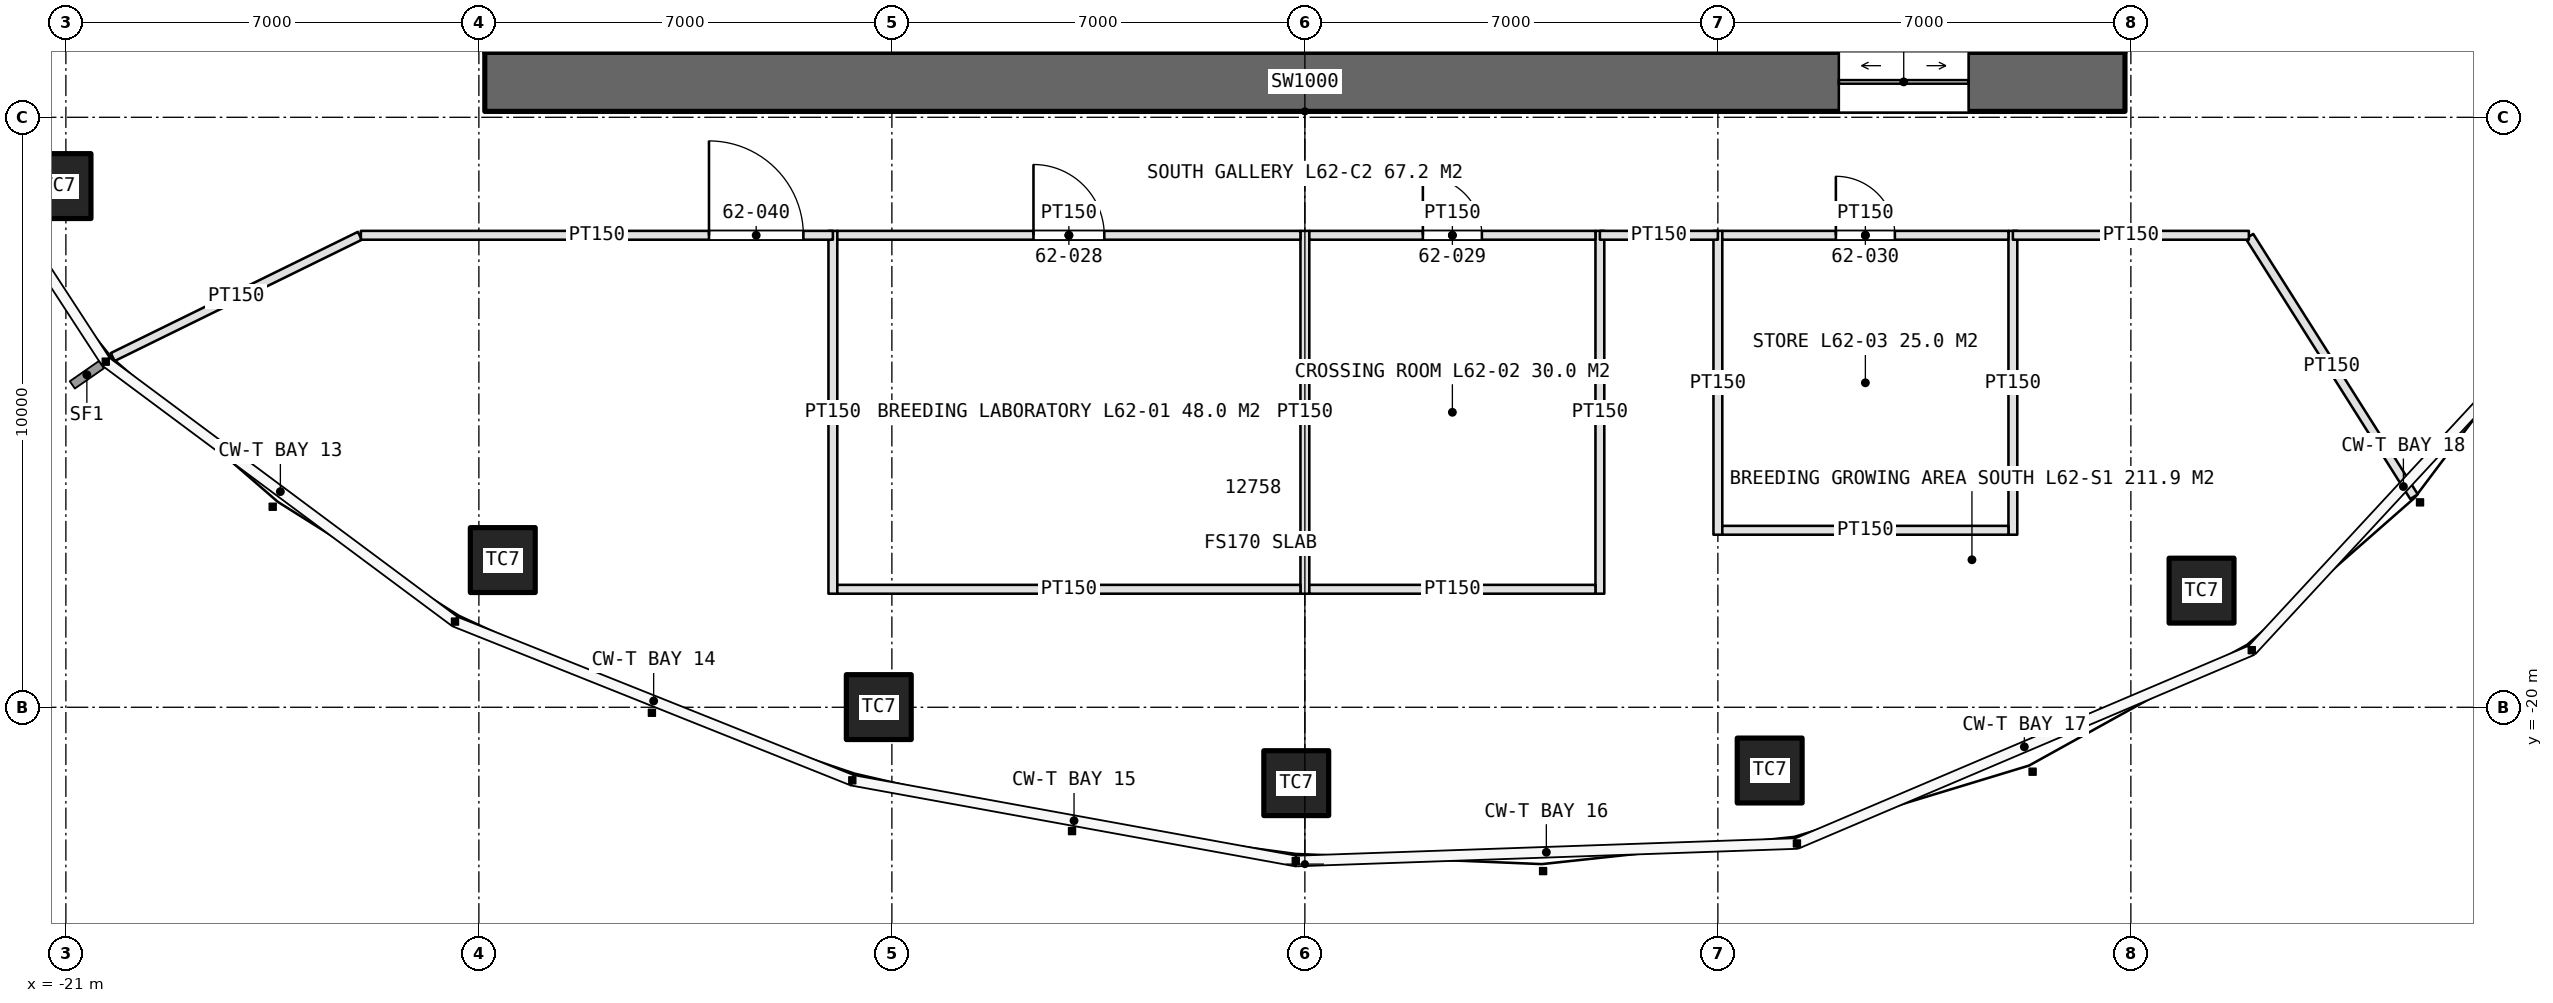
"""IFC4 building model, lengths in metres.
Left out: names, types, materials, properties, quantities, classifications, styles, units other than length and angle.
Written with IfcOpenShell. Run it as: python <this file> out.ifc"""

import sys

from ifc_helpers import new_model, si_unit, direction, frame, frame_2d, origin, origin_2d, place, context, subcontext, project, spatial, rectangle, extrude, element, fill, save


model = new_model("IFC4")
c1 = context("Model", 3, precision=1e-05, world=origin(), true_north=direction((0.0, 1.0)))
c2 = subcontext(c1, "Body", "Model", "MODEL_VIEW")
j1 = project(units=[si_unit("LENGTHUNIT", "METRE"), si_unit("PLANEANGLEUNIT", "RADIAN")], contexts=[c1])
p1 = place(None, origin())
s1 = spatial("IfcSite", under=j1, at=p1, CompositionType="ELEMENT")
p2 = place(p1, origin())
s2 = spatial("IfcBuilding", under=s1, at=p2, CompositionType="ELEMENT")
p3 = place(p2, frame((0.0, 0.0, 279.6)))
s3 = spatial("IfcBuildingStorey", under=s2, at=p3, CompositionType="ELEMENT", Elevation=279.6)
p4 = place(p3, frame((-13.9, -9.4, 0.0), z_axis=(0.0, 0.0, 1.0), x_axis=(1.0, 0.0, 0.0)))
e1 = element("IfcWall", 1, at=p4, inside=s3, PredefinedType="SHEAR", context=c2, shape_type="SweptSolid", body=[
    extrude(rectangle(XDim=27.8, YDim=1.0, at=frame_2d((13.9, 0.0))), origin(), (0.0, 0.0, 1.0), 4.2),
])
p5 = place(p4, frame((22.95, 0.0, 0.0)))
e2 = element("IfcOpeningElement", 2, at=p5, cuts=e1, PredefinedType="OPENING", context=c2, shape_type="SweptSolid", body=[
    extrude(rectangle(XDim=2.2, YDim=2.7, at=frame_2d((1.1, 1.35))), frame((0.0, 0.51, 0.0), z_axis=(0.0, -1.0, 0.0), x_axis=(1.0, 0.0, 0.0)), (0.0, 0.0, 1.0), 1.02),
])
for number, where, z_axis, x_axis in (
    (3, (-21.125, -11.166, 0.0), (0.0, 0.0, 1.0), (1.0, 0.0, 0.0)),
    (4, (-13.595, -17.505, 0.0), (0.0, 0.0, 1.0), (1.0, 0.0, 0.0)),
    (5, (-7.222, -19.997, 0.0), (0.0, 0.0, 1.0), (1.0, 0.0, 0.0)),
    (6, (-0.146, -21.286, 0.0), (0.0, 0.0, 1.0), (1.0, 0.0, 0.0)),
    (7, (7.878, -21.072, 0.0), (0.0, 0.0, 1.0), (1.0, 0.0, 0.0)),
    (8, (15.198, -18.023, 0.0), (0.0, 0.0, 1.0), (1.0, 0.0, 0.0)),
):
    element("IfcColumn", number, at=place(p3, frame(where, z_axis=z_axis, x_axis=x_axis)), inside=s3, PredefinedType="COLUMN", context=c2, shape_type="SweptSolid", body=[
        extrude(rectangle(XDim=1.1, YDim=1.1, at=origin_2d()), origin(), (0.0, 0.0, 1.0), 4.2),
    ])
for number, where, z_axis, x_axis in (
    (9, (-4.2, -4.7, 0.0), (0.0, 0.0, 1.0), (0.0, -1.0, 0.0)),
    (10, (-1.4, -4.7, 0.0), (0.0, 0.0, 1.0), (0.0, -1.0, 0.0)),
    (11, (1.4, -4.7, 0.0), (0.0, 0.0, 1.0), (0.0, -1.0, 0.0)),
    (12, (4.2, -4.7, 0.0), (0.0, 0.0, 1.0), (0.0, -1.0, 0.0)),
):
    element("IfcWall", number, at=place(p3, frame(where, z_axis=z_axis, x_axis=x_axis)), inside=s3, PredefinedType="PARTITIONING", context=c2, shape_type="SweptSolid", body=[
        extrude(rectangle(XDim=4.2, YDim=0.2, at=frame_2d((2.1, 0.0))), origin(), (0.0, 0.0, 1.0), 4.2),
    ])
for number, where, z_axis, x_axis in (
    (13, (-8.0, -11.925, 0.0), (0.0, 0.0, 1.0), (0.0, -1.0, 0.0)),
    (14, (0.0, -11.925, 0.0), (0.0, 0.0, 1.0), (0.0, -1.0, 0.0)),
    (15, (5.0, -11.925, 0.0), (0.0, 0.0, 1.0), (0.0, -1.0, 0.0)),
):
    element("IfcWall", number, at=place(p3, frame(where, z_axis=z_axis, x_axis=x_axis)), inside=s3, PredefinedType="PARTITIONING", context=c2, shape_type="SweptSolid", body=[
        extrude(rectangle(XDim=6.15, YDim=0.15, at=frame_2d((3.075, 0.0))), origin(), (0.0, 0.0, 1.0), 3.0),
    ])
p6 = place(p3, frame((-7.925, -12.0, 0.0), z_axis=(0.0, 0.0, 1.0), x_axis=(1.0, 0.0, 0.0)))
e16 = element("IfcWall", 16, at=p6, inside=s3, PredefinedType="PARTITIONING", context=c2, shape_type="SweptSolid", body=[
    extrude(rectangle(XDim=7.85, YDim=0.15, at=frame_2d((3.925, 0.0))), origin(), (0.0, 0.0, 1.0), 3.0),
])
p7 = place(p6, frame((3.325, 0.0, 0.0)))
e17 = element("IfcOpeningElement", 17, at=p7, cuts=e16, PredefinedType="OPENING", context=c2, shape_type="SweptSolid", body=[
    extrude(rectangle(XDim=1.2, YDim=2.3, at=frame_2d((0.6, 1.15))), frame((0.0, 0.085, 0.0), z_axis=(0.0, -1.0, 0.0), x_axis=(1.0, 0.0, 0.0)), (0.0, 0.0, 1.0), 0.17),
])
p8 = place(p3, frame((-7.925, -18.0, 0.0), z_axis=(0.0, 0.0, 1.0), x_axis=(1.0, 0.0, 0.0)))
e18 = element("IfcWall", 18, at=p8, inside=s3, PredefinedType="PARTITIONING", context=c2, shape_type="SweptSolid", body=[
    extrude(rectangle(XDim=7.85, YDim=0.15, at=frame_2d((3.925, 0.0))), origin(), (0.0, 0.0, 1.0), 3.0),
])
p9 = place(p3, frame((0.075, -12.0, 0.0), z_axis=(0.0, 0.0, 1.0), x_axis=(1.0, 0.0, 0.0)))
e19 = element("IfcWall", 19, at=p9, inside=s3, PredefinedType="PARTITIONING", context=c2, shape_type="SweptSolid", body=[
    extrude(rectangle(XDim=4.85, YDim=0.15, at=frame_2d((2.425, 0.0))), origin(), (0.0, 0.0, 1.0), 3.0),
])
p10 = place(p9, frame((1.925, 0.0, 0.0)))
e20 = element("IfcOpeningElement", 20, at=p10, cuts=e19, PredefinedType="OPENING", context=c2, shape_type="SweptSolid", body=[
    extrude(rectangle(XDim=1.0, YDim=2.2, at=frame_2d((0.5, 1.1))), frame((0.0, 0.085, 0.0), z_axis=(0.0, -1.0, 0.0), x_axis=(1.0, 0.0, 0.0)), (0.0, 0.0, 1.0), 0.17),
])
p11 = place(p3, frame((0.075, -18.0, 0.0), z_axis=(0.0, 0.0, 1.0), x_axis=(1.0, 0.0, 0.0)))
e21 = element("IfcWall", 21, at=p11, inside=s3, PredefinedType="PARTITIONING", context=c2, shape_type="SweptSolid", body=[
    extrude(rectangle(XDim=4.85, YDim=0.15, at=frame_2d((2.425, 0.0))), origin(), (0.0, 0.0, 1.0), 3.0),
])
for number, where, z_axis, x_axis in (
    (22, (7.0, -11.925, 0.0), (0.0, 0.0, 1.0), (0.0, -1.0, 0.0)),
    (23, (12.0, -11.925, 0.0), (0.0, 0.0, 1.0), (0.0, -1.0, 0.0)),
):
    element("IfcWall", number, at=place(p3, frame(where, z_axis=z_axis, x_axis=x_axis)), inside=s3, PredefinedType="PARTITIONING", context=c2, shape_type="SweptSolid", body=[
        extrude(rectangle(XDim=5.15, YDim=0.15, at=frame_2d((2.575, 0.0))), origin(), (0.0, 0.0, 1.0), 3.0),
    ])
p12 = place(p3, frame((7.075, -12.0, 0.0), z_axis=(0.0, 0.0, 1.0), x_axis=(1.0, 0.0, 0.0)))
e24 = element("IfcWall", 24, at=p12, inside=s3, PredefinedType="PARTITIONING", context=c2, shape_type="SweptSolid", body=[
    extrude(rectangle(XDim=4.85, YDim=0.15, at=frame_2d((2.425, 0.0))), origin(), (0.0, 0.0, 1.0), 3.0),
])
p13 = place(p12, frame((1.925, 0.0, 0.0)))
e25 = element("IfcOpeningElement", 25, at=p13, cuts=e24, PredefinedType="OPENING", context=c2, shape_type="SweptSolid", body=[
    extrude(rectangle(XDim=1.0, YDim=2.2, at=frame_2d((0.5, 1.1))), frame((0.0, 0.085, 0.0), z_axis=(0.0, -1.0, 0.0), x_axis=(1.0, 0.0, 0.0)), (0.0, 0.0, 1.0), 0.17),
])
p14 = place(p3, frame((7.075, -17.0, 0.0), z_axis=(0.0, 0.0, 1.0), x_axis=(1.0, 0.0, 0.0)))
e26 = element("IfcWall", 26, at=p14, inside=s3, PredefinedType="PARTITIONING", context=c2, shape_type="SweptSolid", body=[
    extrude(rectangle(XDim=4.85, YDim=0.15, at=frame_2d((2.425, 0.0))), origin(), (0.0, 0.0, 1.0), 3.0),
])
p15 = place(p3, frame((-16.018, -12.009, 0.0), z_axis=(0.0, 0.0, 1.0), x_axis=(-0.897771840996, -0.440460805879, 0.0)))
e27 = element("IfcWall", 27, at=p15, inside=s3, PredefinedType="PARTITIONING", context=c2, shape_type="SweptSolid", body=[
    extrude(rectangle(XDim=4.666, YDim=0.15, at=frame_2d((2.333, 0.0))), origin(), (0.0, 0.0, 1.0), 3.0),
])
p16 = place(p3, frame((16.011, -12.017, 0.0), z_axis=(0.0, 0.0, 1.0), x_axis=(0.53415837449, -0.845384427916, 0.0)))
e28 = element("IfcWall", 28, at=p16, inside=s3, PredefinedType="PARTITIONING", context=c2, shape_type="SweptSolid", body=[
    extrude(rectangle(XDim=5.22, YDim=0.15, at=frame_2d((2.61, 0.0))), origin(), (0.0, 0.0, 1.0), 3.0),
])
p17 = place(p3, frame((-16.0, -12.0, 0.0), z_axis=(0.0, 0.0, 1.0), x_axis=(1.0, 0.0, 0.0)))
e29 = element("IfcWall", 29, at=p17, inside=s3, PredefinedType="PARTITIONING", context=c2, shape_type="SweptSolid", body=[
    extrude(rectangle(XDim=8.0, YDim=0.15, at=frame_2d((4.0, 0.0))), origin(), (0.0, 0.0, 1.0), 3.0),
])
p18 = place(p17, frame((5.9, 0.0, 0.0)))
e30 = element("IfcOpeningElement", 30, at=p18, cuts=e29, PredefinedType="OPENING", context=c2, shape_type="SweptSolid", body=[
    extrude(rectangle(XDim=1.6, YDim=2.4, at=frame_2d((0.8, 1.2))), frame((0.0, 0.085, 0.0), z_axis=(0.0, -1.0, 0.0), x_axis=(1.0, 0.0, 0.0)), (0.0, 0.0, 1.0), 0.17),
])
p19 = place(p3, frame((5.0, -12.0, 0.0), z_axis=(0.0, 0.0, 1.0), x_axis=(1.0, 0.0, 0.0)))
e31 = element("IfcWall", 31, at=p19, inside=s3, PredefinedType="PARTITIONING", context=c2, shape_type="SweptSolid", body=[
    extrude(rectangle(XDim=2.0, YDim=0.15, at=frame_2d((1.0, 0.0))), origin(), (0.0, 0.0, 1.0), 3.0),
])
p20 = place(p3, frame((12.0, -12.0, 0.0), z_axis=(0.0, 0.0, 1.0), x_axis=(1.0, 0.0, 0.0)))
e32 = element("IfcWall", 32, at=p20, inside=s3, PredefinedType="PARTITIONING", context=c2, shape_type="SweptSolid", body=[
    extrude(rectangle(XDim=4.0, YDim=0.15, at=frame_2d((2.0, 0.0))), origin(), (0.0, 0.0, 1.0), 3.0),
])
p21 = place(p5, origin())
e33 = element("IfcDoor", 33, at=p21, inside=s3, OperationType="DOUBLE_DOOR_SLIDING", PredefinedType="DOOR", context=c2, shape_type="SweptSolid", body=[
    extrude(rectangle(XDim=2.2, YDim=2.7, at=frame_2d((1.1, 1.35))), frame((0.0, 0.025, 0.0), z_axis=(0.0, -1.0, 0.0), x_axis=(1.0, 0.0, 0.0)), (0.0, 0.0, 1.0), 0.05),
])
fill(e2, e33)
p22 = place(p7, origin())
e34 = element("IfcDoor", 34, at=p22, inside=s3, OperationType="SINGLE_SWING_LEFT", PredefinedType="DOOR", context=c2, shape_type="SweptSolid", body=[
    extrude(rectangle(XDim=1.2, YDim=2.3, at=frame_2d((0.6, 1.15))), frame((0.0, 0.025, 0.0), z_axis=(0.0, -1.0, 0.0), x_axis=(1.0, 0.0, 0.0)), (0.0, 0.0, 1.0), 0.05),
])
fill(e17, e34)
p23 = place(p10, origin())
e35 = element("IfcDoor", 35, at=p23, inside=s3, OperationType="SINGLE_SWING_LEFT", PredefinedType="DOOR", context=c2, shape_type="SweptSolid", body=[
    extrude(rectangle(XDim=1.0, YDim=2.2, at=frame_2d((0.5, 1.1))), frame((0.0, 0.025, 0.0), z_axis=(0.0, -1.0, 0.0), x_axis=(1.0, 0.0, 0.0)), (0.0, 0.0, 1.0), 0.05),
])
fill(e20, e35)
p24 = place(p13, origin())
e36 = element("IfcDoor", 36, at=p24, inside=s3, OperationType="SINGLE_SWING_LEFT", PredefinedType="DOOR", context=c2, shape_type="SweptSolid", body=[
    extrude(rectangle(XDim=1.0, YDim=2.2, at=frame_2d((0.5, 1.1))), frame((0.0, 0.025, 0.0), z_axis=(0.0, -1.0, 0.0), x_axis=(1.0, 0.0, 0.0)), (0.0, 0.0, 1.0), 0.05),
])
fill(e25, e36)
p25 = place(p18, origin())
e37 = element("IfcDoor", 37, at=p25, inside=s3, OperationType="DOUBLE_DOOR_SINGLE_SWING", PredefinedType="DOOR", context=c2, shape_type="SweptSolid", body=[
    extrude(rectangle(XDim=1.6, YDim=2.4, at=frame_2d((0.8, 1.2))), frame((0.0, 0.025, 0.0), z_axis=(0.0, -1.0, 0.0), x_axis=(1.0, 0.0, 0.0)), (0.0, 0.0, 1.0), 0.05),
])
fill(e30, e37)
save(model, sys.argv[1])
